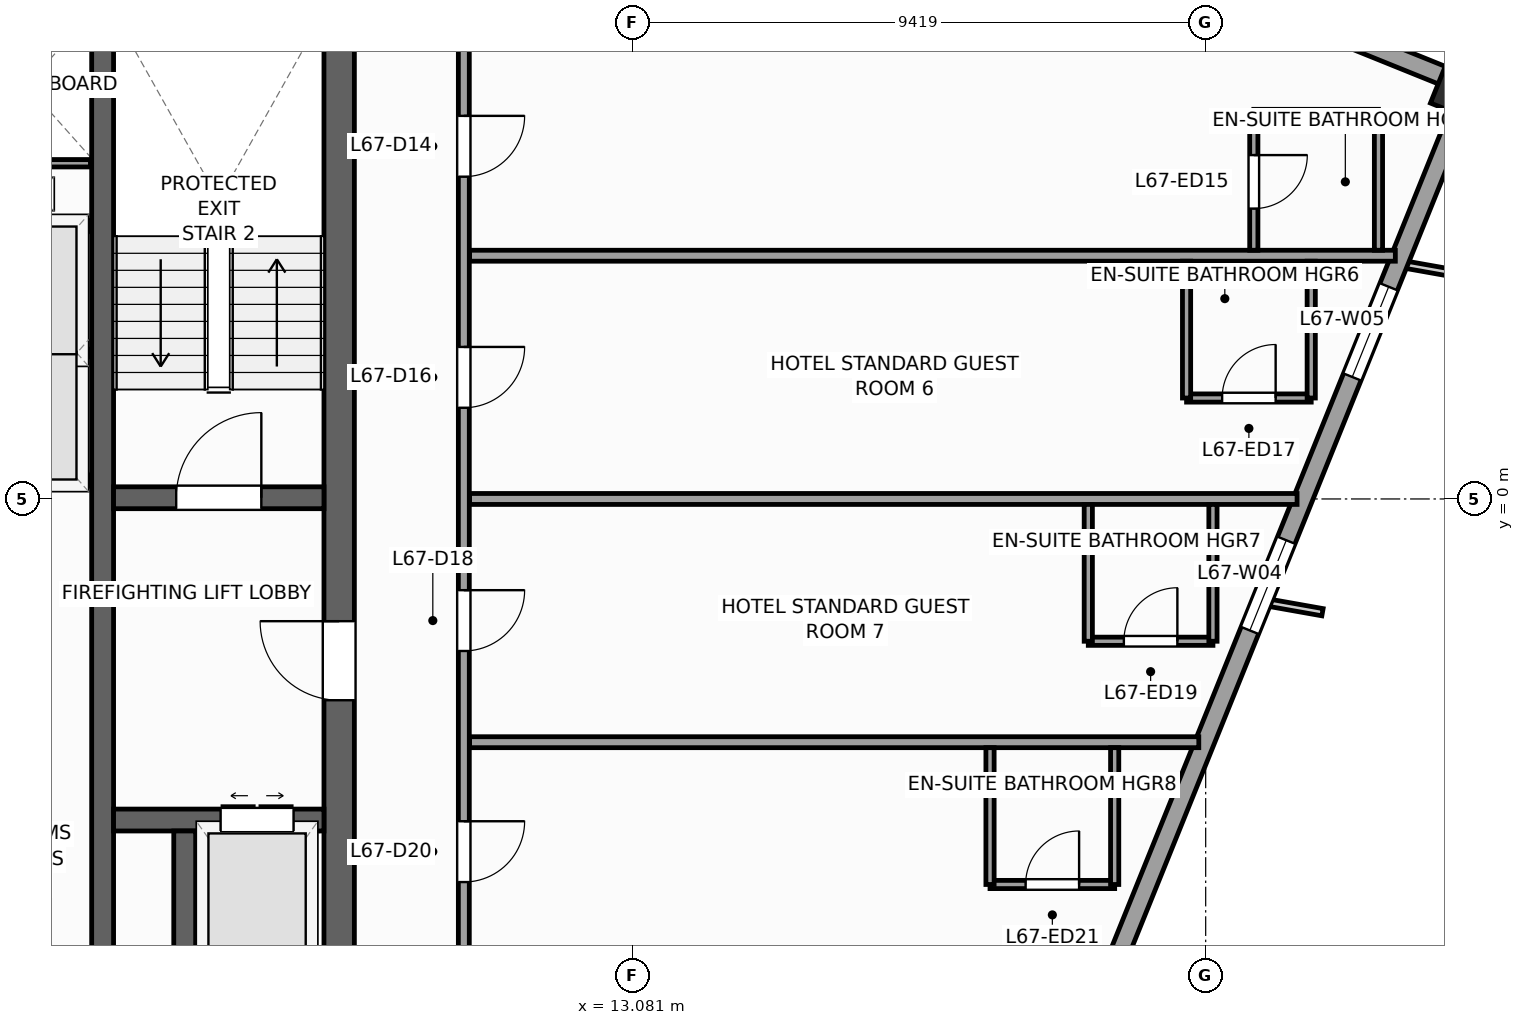
"""IFC4 building model, lengths in metres.
Left out: names, types, materials, properties, quantities, classifications, styles, units other than length and angle.
Written with IfcOpenShell. Run it as: python <this file> out.ifc"""

import sys

from ifc_helpers import new_model, si_unit, direction, frame, frame_2d, origin, origin_2d, place, context, subcontext, project, spatial, rectangle, extrude, source, transform, mapped, element, fill, save


model = new_model("IFC4")
c1 = context("Model", 3, precision=1e-05, world=origin(), true_north=direction((0.0, 1.0)))
c2 = subcontext(c1, "Body", "Model", "MODEL_VIEW")
j1 = project(units=[si_unit("LENGTHUNIT", "METRE"), si_unit("PLANEANGLEUNIT", "RADIAN")], contexts=[c1])
p1 = place(None, origin())
s1 = spatial("IfcSite", under=j1, at=p1, CompositionType="ELEMENT")
p2 = place(p1, origin())
s2 = spatial("IfcBuilding", under=s1, at=p2, CompositionType="ELEMENT")
p3 = place(p2, frame((0.0, 0.0, 276.0)))
s3 = spatial("IfcBuildingStorey", under=s2, at=p3, CompositionType="ELEMENT", Elevation=276.0)
p4 = place(p3, frame((8.25, -8.0, 0.0), z_axis=(0.0, 0.0, 1.0), x_axis=(0.0, 1.0, 0.0)))
e1 = element("IfcWall", 1, at=p4, inside=s3, PredefinedType="SHEAR", context=c2, shape_type="SweptSolid", body=[
    extrude(rectangle(XDim=16.0, YDim=0.5, at=frame_2d((8.0, 0.0))), origin(), (0.0, 0.0, 1.0), 3.6),
])
p5 = place(p4, frame((4.69, 0.0, 0.0)))
e2 = element("IfcOpeningElement", 2, at=p5, cuts=e1, PredefinedType="OPENING", context=c2, shape_type="SweptSolid", body=[
    extrude(rectangle(XDim=1.3, YDim=2.2, at=frame_2d((0.65, 1.1))), frame((0.0, 0.26, 0.0), z_axis=(0.0, -1.0, 0.0), x_axis=(1.0, 0.0, 0.0)), (0.0, 0.0, 1.0), 0.52),
])
p6 = place(p3, frame((4.36, -8.0, 0.0), z_axis=(0.0, 0.0, 1.0), x_axis=(0.0, 1.0, 0.0)))
e3 = element("IfcWall", 3, at=p6, inside=s3, PredefinedType="SHEAR", context=c2, shape_type="SweptSolid", body=[
    extrude(rectangle(XDim=16.0, YDim=0.36, at=frame_2d((8.0, 0.0))), origin(), (0.0, 0.0, 1.0), 3.6),
])
p7 = place(p3, frame((4.54, 0.02, 0.0), z_axis=(0.0, 0.0, 1.0), x_axis=(1.0, 0.0, 0.0)))
e4 = element("IfcWall", 4, at=p7, inside=s3, PredefinedType="SHEAR", context=c2, shape_type="SweptSolid", body=[
    extrude(rectangle(XDim=3.46, YDim=0.36, at=frame_2d((1.73, 0.0))), origin(), (0.0, 0.0, 1.0), 3.6),
])
p8 = place(p7, frame((1.03, 0.0, 0.0)))
e5 = element("IfcOpeningElement", 5, at=p8, cuts=e4, PredefinedType="OPENING", context=c2, shape_type="SweptSolid", body=[
    extrude(rectangle(XDim=1.4, YDim=2.2, at=frame_2d((0.7, 1.1))), frame((0.0, 0.19, 0.0), z_axis=(0.0, -1.0, 0.0), x_axis=(1.0, 0.0, 0.0)), (0.0, 0.0, 1.0), 0.38),
])
p9 = place(p3, frame((4.54, -5.28, 0.0), z_axis=(0.0, 0.0, 1.0), x_axis=(1.0, 0.0, 0.0)))
e6 = element("IfcWall", 6, at=p9, inside=s3, PredefinedType="SHEAR", context=c2, shape_type="SweptSolid", body=[
    extrude(rectangle(XDim=3.46, YDim=0.36, at=frame_2d((1.73, 0.0))), origin(), (0.0, 0.0, 1.0), 3.6),
])
p10 = place(p9, frame((1.76, 0.0, 0.0)))
e7 = element("IfcOpeningElement", 7, at=p10, cuts=e6, PredefinedType="OPENING", context=c2, shape_type="SweptSolid", body=[
    extrude(rectangle(XDim=1.2, YDim=2.25, at=frame_2d((0.6, 1.125))), frame((0.0, 0.19, 0.0), z_axis=(0.0, -1.0, 0.0), x_axis=(1.0, 0.0, 0.0)), (0.0, 0.0, 1.0), 0.38),
])
p11 = place(p3, frame((5.71, -8.0, 0.0), z_axis=(0.0, 0.0, 1.0), x_axis=(0.0, 1.0, 0.0)))
e8 = element("IfcWall", 8, at=p11, inside=s3, PredefinedType="SHEAR", context=c2, shape_type="SweptSolid", body=[
    extrude(rectangle(XDim=2.54, YDim=0.36, at=frame_2d((1.27, 0.0))), origin(), (0.0, 0.0, 1.0), 3.6),
])
m1 = source(origin(), c2, "Body", "SweptSolid", [
    extrude(rectangle(XDim=0.65, YDim=0.65, at=origin_2d()), origin(), (0.0, 0.0, 1.0), 3.6),
])
p12 = place(p3, frame((26.62, 6.69, 0.0), z_axis=(0.0, 0.0, 1.0), x_axis=(0.374606593416, 0.927183854567, 0.0)))
e9 = element("IfcColumn", 9, at=p12, inside=s3, PredefinedType="COLUMN", context=c2, shape_type="MappedRepresentation", body=[
    mapped(m1, transform((0.0, 0.0, 0.0), scale=1.0)),
])
p13 = place(p3, frame((14.479, -23.813, 0.0), z_axis=(0.0, 0.0, 1.0), x_axis=(0.374609557019, 0.927182657188, 0.0)))
e10 = element("IfcWall", 10, at=p13, inside=s3, PredefinedType="STANDARD", context=c2, shape_type="SweptSolid", body=[
    extrude(rectangle(XDim=33.31, YDim=0.31, at=frame_2d((16.655, 0.0))), origin(), (0.0, 0.0, 1.0), 2.75),
])
p14 = place(p13, frame((3.197, 0.0, 0.47)))
e11 = element("IfcOpeningElement", 11, at=p14, cuts=e10, PredefinedType="OPENING", context=c2, shape_type="SweptSolid", body=[
    extrude(rectangle(XDim=1.6, YDim=2.1, at=frame_2d((0.8, 1.05))), frame((0.0, 0.165, 0.0), z_axis=(0.0, -1.0, 0.0), x_axis=(1.0, 0.0, 0.0)), (0.0, 0.0, 1.0), 0.33),
])
p15 = place(p13, frame((8.86, 0.0, 0.47)))
e12 = element("IfcOpeningElement", 12, at=p15, cuts=e10, PredefinedType="OPENING", context=c2, shape_type="SweptSolid", body=[
    extrude(rectangle(XDim=1.6, YDim=2.1, at=frame_2d((0.8, 1.05))), frame((0.0, 0.165, 0.0), z_axis=(0.0, -1.0, 0.0), x_axis=(1.0, 0.0, 0.0)), (0.0, 0.0, 1.0), 0.33),
])
p16 = place(p13, frame((14.439, 0.0, 0.47)))
e13 = element("IfcOpeningElement", 13, at=p16, cuts=e10, PredefinedType="OPENING", context=c2, shape_type="SweptSolid", body=[
    extrude(rectangle(XDim=1.6, YDim=2.1, at=frame_2d((0.8, 1.05))), frame((0.0, 0.165, 0.0), z_axis=(0.0, -1.0, 0.0), x_axis=(1.0, 0.0, 0.0)), (0.0, 0.0, 1.0), 0.33),
])
p17 = place(p13, frame((23.351, 0.0, 0.47)))
e14 = element("IfcOpeningElement", 14, at=p17, cuts=e10, PredefinedType="OPENING", context=c2, shape_type="SweptSolid", body=[
    extrude(rectangle(XDim=1.6, YDim=2.1, at=frame_2d((0.8, 1.05))), frame((0.0, 0.165, 0.0), z_axis=(0.0, -1.0, 0.0), x_axis=(1.0, 0.0, 0.0)), (0.0, 0.0, 1.0), 0.33),
])
p18 = place(p13, frame((27.847, 0.0, 0.47)))
e15 = element("IfcOpeningElement", 15, at=p18, cuts=e10, PredefinedType="OPENING", context=c2, shape_type="SweptSolid", body=[
    extrude(rectangle(XDim=1.6, YDim=2.1, at=frame_2d((0.8, 1.05))), frame((0.0, 0.165, 0.0), z_axis=(0.0, -1.0, 0.0), x_axis=(1.0, 0.0, 0.0)), (0.0, 0.0, 1.0), 0.33),
])
p19 = place(p3, frame((26.841, 6.784, 0.0), z_axis=(0.0, 0.0, 1.0), x_axis=(-0.927171722085, 0.374636620962, 0.0)))
e16 = element("IfcWall", 16, at=p19, inside=s3, PredefinedType="STANDARD", context=c2, shape_type="SweptSolid", body=[
    extrude(rectangle(XDim=6.0, YDim=0.31, at=frame_2d((3.0, 0.0))), origin(), (0.0, 0.0, 1.0), 2.65),
])
for number, where, z_axis, x_axis in (
    (17, (1.89, 0.3, 0.0), (0.0, 0.0, 1.0), (1.0, 0.0, 0.0)),
    (18, (1.89, 4.49, 0.0), (0.0, 0.0, 1.0), (1.0, 0.0, 0.0)),
):
    element("IfcWall", number, at=place(p3, frame(where, z_axis=z_axis, x_axis=x_axis)), inside=s3, PredefinedType="PARTITIONING", context=c2, shape_type="SweptSolid", body=[
        extrude(rectangle(XDim=2.28, YDim=0.18, at=frame_2d((1.14, 0.0))), origin(), (0.0, 0.0, 1.0), 3.35),
    ])
p20 = place(p3, frame((1.9, 2.4, 0.0), z_axis=(0.0, 0.0, 1.0), x_axis=(1.0, 0.0, 0.0)))
e19 = element("IfcWall", 19, at=p20, inside=s3, PredefinedType="PARTITIONING", context=c2, shape_type="SweptSolid", body=[
    extrude(rectangle(XDim=2.26, YDim=0.12, at=frame_2d((1.13, 0.0))), origin(), (0.0, 0.0, 1.0), 3.35),
])
p21 = place(p3, frame((2.06, 5.52, 0.0), z_axis=(0.0, 0.0, 1.0), x_axis=(1.0, 0.0, 0.0)))
e20 = element("IfcWall", 20, at=p21, inside=s3, PredefinedType="PARTITIONING", context=c2, shape_type="SweptSolid", body=[
    extrude(rectangle(XDim=2.1, YDim=0.12, at=frame_2d((1.05, 0.0))), origin(), (0.0, 0.0, 1.0), 3.35),
])
p22 = place(p3, frame((10.3, -12.35, 0.0), z_axis=(0.0, 0.0, 1.0), x_axis=(0.0, 1.0, 0.0)))
e21 = element("IfcWall", 21, at=p22, inside=s3, PredefinedType="PARTITIONING", context=c2, shape_type="SweptSolid", body=[
    extrude(rectangle(XDim=23.7, YDim=0.18, at=frame_2d((11.85, 0.0))), origin(), (0.0, 0.0, 1.0), 3.35),
])
p23 = place(p22, frame((17.65, 0.0, 0.0)))
e22 = element("IfcOpeningElement", 22, at=p23, cuts=e21, PredefinedType="OPENING", context=c2, shape_type="SweptSolid", body=[
    extrude(rectangle(XDim=1.0, YDim=2.15, at=frame_2d((0.5, 1.075))), frame((0.0, 0.1, 0.0), z_axis=(0.0, -1.0, 0.0), x_axis=(1.0, 0.0, 0.0)), (0.0, 0.0, 1.0), 0.2),
])
p24 = place(p22, frame((13.85, 0.0, 0.0)))
e23 = element("IfcOpeningElement", 23, at=p24, cuts=e21, PredefinedType="OPENING", context=c2, shape_type="SweptSolid", body=[
    extrude(rectangle(XDim=1.0, YDim=2.15, at=frame_2d((0.5, 1.075))), frame((0.0, 0.1, 0.0), z_axis=(0.0, -1.0, 0.0), x_axis=(1.0, 0.0, 0.0)), (0.0, 0.0, 1.0), 0.2),
])
p25 = place(p22, frame((9.85, 0.0, 0.0)))
e24 = element("IfcOpeningElement", 24, at=p25, cuts=e21, PredefinedType="OPENING", context=c2, shape_type="SweptSolid", body=[
    extrude(rectangle(XDim=1.0, YDim=2.15, at=frame_2d((0.5, 1.075))), frame((0.0, 0.1, 0.0), z_axis=(0.0, -1.0, 0.0), x_axis=(1.0, 0.0, 0.0)), (0.0, 0.0, 1.0), 0.2),
])
p26 = place(p22, frame((6.05, 0.0, 0.0)))
e25 = element("IfcOpeningElement", 25, at=p26, cuts=e21, PredefinedType="OPENING", context=c2, shape_type="SweptSolid", body=[
    extrude(rectangle(XDim=1.0, YDim=2.15, at=frame_2d((0.5, 1.075))), frame((0.0, 0.1, 0.0), z_axis=(0.0, -1.0, 0.0), x_axis=(1.0, 0.0, 0.0)), (0.0, 0.0, 1.0), 0.2),
])
p27 = place(p3, frame((10.395, 4.0, 0.0), z_axis=(0.0, 0.0, 1.0), x_axis=(1.0, 0.0, 0.0)))
e26 = element("IfcWall", 26, at=p27, inside=s3, PredefinedType="PARTITIONING", context=c2, shape_type="SweptSolid", body=[
    extrude(rectangle(XDim=15.224, YDim=0.18, at=frame_2d((7.612, 0.0))), origin(), (0.0, 0.0, 1.0), 3.35),
])
p28 = place(p3, frame((10.395, 0.0, 0.0), z_axis=(0.0, 0.0, 1.0), x_axis=(1.0, 0.0, 0.0)))
e27 = element("IfcWall", 27, at=p28, inside=s3, PredefinedType="PARTITIONING", context=c2, shape_type="SweptSolid", body=[
    extrude(rectangle(XDim=13.608, YDim=0.18, at=frame_2d((6.804, 0.0))), origin(), (0.0, 0.0, 1.0), 3.02),
])
p29 = place(p3, frame((10.395, -4.0, 0.0), z_axis=(0.0, 0.0, 1.0), x_axis=(1.0, 0.0, 0.0)))
e28 = element("IfcWall", 28, at=p29, inside=s3, PredefinedType="PARTITIONING", context=c2, shape_type="SweptSolid", body=[
    extrude(rectangle(XDim=11.992, YDim=0.18, at=frame_2d((5.996, 0.0))), origin(), (0.0, 0.0, 1.0), 3.02),
])
p30 = place(p3, frame((25.342, 4.09, 0.0), z_axis=(0.0, 0.0, 1.0), x_axis=(0.0, 1.0, 0.0)))
e29 = element("IfcWall", 29, at=p30, inside=s3, PredefinedType="PARTITIONING", context=c2, shape_type="SweptSolid", body=[
    extrude(rectangle(XDim=2.25, YDim=0.135, at=frame_2d((1.125, 0.0))), origin(), (0.0, 0.0, 1.0), 2.75),
])
p31 = place(p3, frame((23.292, 6.34, 0.0), z_axis=(0.0, 0.0, 1.0), x_axis=(1.0, 0.0, 0.0)))
e30 = element("IfcWall", 30, at=p31, inside=s3, PredefinedType="PARTITIONING", context=c2, shape_type="SweptSolid", body=[
    extrude(rectangle(XDim=2.05, YDim=0.135, at=frame_2d((1.025, 0.0))), origin(), (0.0, 0.0, 1.0), 3.35),
])
p32 = place(p3, frame((23.292, 4.09, 0.0), z_axis=(0.0, 0.0, 1.0), x_axis=(0.0, 1.0, 0.0)))
e31 = element("IfcWall", 31, at=p32, inside=s3, PredefinedType="PARTITIONING", context=c2, shape_type="SweptSolid", body=[
    extrude(rectangle(XDim=2.25, YDim=0.135, at=frame_2d((1.125, 0.0))), origin(), (0.0, 0.0, 1.0), 2.95),
])
p33 = place(p32, frame((0.685, 0.0, 0.0)))
e32 = element("IfcOpeningElement", 32, at=p33, cuts=e31, PredefinedType="OPENING", context=c2, shape_type="SweptSolid", body=[
    extrude(rectangle(XDim=0.88, YDim=2.1, at=frame_2d((0.44, 1.05))), frame((0.0, 0.078, 0.0), z_axis=(0.0, -1.0, 0.0), x_axis=(1.0, 0.0, 0.0)), (0.0, 0.0, 1.0), 0.155),
])
p34 = place(p3, frame((22.186, 1.66, 0.0), z_axis=(0.0, 0.0, 1.0), x_axis=(1.0, 0.0, 0.0)))
e33 = element("IfcWall", 33, at=p34, inside=s3, PredefinedType="PARTITIONING", context=c2, shape_type="SweptSolid", body=[
    extrude(rectangle(XDim=2.05, YDim=0.135, at=frame_2d((1.025, 0.0))), origin(), (0.0, 0.0, 1.0), 3.35),
])
p35 = place(p34, frame((0.585, 0.0, 0.0)))
e34 = element("IfcOpeningElement", 34, at=p35, cuts=e33, PredefinedType="OPENING", context=c2, shape_type="SweptSolid", body=[
    extrude(rectangle(XDim=0.88, YDim=2.1, at=frame_2d((0.44, 1.05))), frame((0.0, 0.078, 0.0), z_axis=(0.0, -1.0, 0.0), x_axis=(1.0, 0.0, 0.0)), (0.0, 0.0, 1.0), 0.155),
])
for number, where, z_axis, x_axis in (
    (35, (24.236, 1.66, 0.0), (0.0, 0.0, 1.0), (0.0, 1.0, 0.0)),
    (36, (22.186, 1.66, 0.0), (0.0, 0.0, 1.0), (0.0, 1.0, 0.0)),
):
    element("IfcWall", number, at=place(p3, frame(where, z_axis=z_axis, x_axis=x_axis)), inside=s3, PredefinedType="PARTITIONING", context=c2, shape_type="SweptSolid", body=[
        extrude(rectangle(XDim=2.25, YDim=0.135, at=frame_2d((1.125, 0.0))), origin(), (0.0, 0.0, 1.0), 3.35),
    ])
p36 = place(p3, frame((20.57, -2.34, 0.0), z_axis=(0.0, 0.0, 1.0), x_axis=(1.0, 0.0, 0.0)))
e37 = element("IfcWall", 37, at=p36, inside=s3, PredefinedType="PARTITIONING", context=c2, shape_type="SweptSolid", body=[
    extrude(rectangle(XDim=2.05, YDim=0.135, at=frame_2d((1.025, 0.0))), origin(), (0.0, 0.0, 1.0), 3.35),
])
p37 = place(p36, frame((0.585, 0.0, 0.0)))
e38 = element("IfcOpeningElement", 38, at=p37, cuts=e37, PredefinedType="OPENING", context=c2, shape_type="SweptSolid", body=[
    extrude(rectangle(XDim=0.88, YDim=2.1, at=frame_2d((0.44, 1.05))), frame((0.0, 0.078, 0.0), z_axis=(0.0, -1.0, 0.0), x_axis=(1.0, 0.0, 0.0)), (0.0, 0.0, 1.0), 0.155),
])
for number, where, z_axis, x_axis in (
    (39, (22.619, -2.34, 0.0), (0.0, 0.0, 1.0), (0.0, 1.0, 0.0)),
    (40, (20.57, -2.34, 0.0), (0.0, 0.0, 1.0), (0.0, 1.0, 0.0)),
):
    element("IfcWall", number, at=place(p3, frame(where, z_axis=z_axis, x_axis=x_axis)), inside=s3, PredefinedType="PARTITIONING", context=c2, shape_type="SweptSolid", body=[
        extrude(rectangle(XDim=2.25, YDim=0.135, at=frame_2d((1.125, 0.0))), origin(), (0.0, 0.0, 1.0), 3.35),
    ])
p38 = place(p3, frame((18.953, -6.34, 0.0), z_axis=(0.0, 0.0, 1.0), x_axis=(1.0, 0.0, 0.0)))
e41 = element("IfcWall", 41, at=p38, inside=s3, PredefinedType="PARTITIONING", context=c2, shape_type="SweptSolid", body=[
    extrude(rectangle(XDim=2.05, YDim=0.135, at=frame_2d((1.025, 0.0))), origin(), (0.0, 0.0, 1.0), 3.35),
])
p39 = place(p38, frame((0.585, 0.0, 0.0)))
e42 = element("IfcOpeningElement", 42, at=p39, cuts=e41, PredefinedType="OPENING", context=c2, shape_type="SweptSolid", body=[
    extrude(rectangle(XDim=0.88, YDim=2.1, at=frame_2d((0.44, 1.05))), frame((0.0, 0.078, 0.0), z_axis=(0.0, -1.0, 0.0), x_axis=(1.0, 0.0, 0.0)), (0.0, 0.0, 1.0), 0.155),
])
for number, where, z_axis, x_axis in (
    (43, (21.003, -6.34, 0.0), (0.0, 0.0, 1.0), (0.0, 1.0, 0.0)),
    (44, (18.953, -6.34, 0.0), (0.0, 0.0, 1.0), (0.0, 1.0, 0.0)),
):
    element("IfcWall", number, at=place(p3, frame(where, z_axis=z_axis, x_axis=x_axis)), inside=s3, PredefinedType="PARTITIONING", context=c2, shape_type="SweptSolid", body=[
        extrude(rectangle(XDim=2.25, YDim=0.135, at=frame_2d((1.125, 0.0))), origin(), (0.0, 0.0, 1.0), 3.35),
    ])
m2 = source(origin(), c2, "Body", "SweptSolid", [
    extrude(rectangle(XDim=1.6, YDim=2.1, at=frame_2d((0.8, 1.05))), frame((0.0, 0.03, 0.0), z_axis=(0.0, -1.0, 0.0), x_axis=(1.0, 0.0, 0.0)), (0.0, 0.0, 1.0), 0.06),
])
p40 = place(p17, origin())
e45 = element("IfcWindow", 45, at=p40, inside=s3, PartitioningType="SINGLE_PANEL", PredefinedType="WINDOW", context=c2, shape_type="MappedRepresentation", body=[
    mapped(m2, transform((0.0, 0.0, 0.0), scale=1.0)),
])
fill(e14, e45)
p41 = place(p18, origin())
e46 = element("IfcWindow", 46, at=p41, inside=s3, PartitioningType="SINGLE_PANEL", PredefinedType="WINDOW", context=c2, shape_type="MappedRepresentation", body=[
    mapped(m2, transform((0.0, 0.0, 0.0), scale=1.0)),
])
fill(e15, e46)
m3 = source(origin(), c2, "Body", "SweptSolid", [
    extrude(rectangle(XDim=1.4, YDim=2.2, at=frame_2d((0.7, 1.1))), frame((0.0, 0.025, 0.0), z_axis=(0.0, -1.0, 0.0), x_axis=(1.0, 0.0, 0.0)), (0.0, 0.0, 1.0), 0.05),
])
p42 = place(p8, origin())
e47 = element("IfcDoor", 47, at=p42, inside=s3, OperationType="SINGLE_SWING_RIGHT", PredefinedType="DOOR", context=c2, shape_type="MappedRepresentation", body=[
    mapped(m3, transform((0.0, 0.0, 0.0), scale=1.0)),
])
fill(e5, e47)
m4 = source(origin(), c2, "Body", "SweptSolid", [
    extrude(rectangle(XDim=1.3, YDim=2.2, at=frame_2d((0.65, 1.1))), frame((0.0, 0.025, 0.0), z_axis=(0.0, -1.0, 0.0), x_axis=(1.0, 0.0, 0.0)), (0.0, 0.0, 1.0), 0.05),
])
p43 = place(p5, origin())
e48 = element("IfcDoor", 48, at=p43, inside=s3, OperationType="SINGLE_SWING_RIGHT", PredefinedType="DOOR", context=c2, shape_type="MappedRepresentation", body=[
    mapped(m4, transform((0.0, 0.0, 0.0), scale=1.0)),
])
fill(e2, e48)
m5 = source(origin(), c2, "Body", "SweptSolid", [
    extrude(rectangle(XDim=1.2, YDim=2.25, at=frame_2d((0.6, 1.125))), frame((0.0, 0.025, 0.0), z_axis=(0.0, -1.0, 0.0), x_axis=(1.0, 0.0, 0.0)), (0.0, 0.0, 1.0), 0.05),
])
p44 = place(p10, origin())
e49 = element("IfcDoor", 49, at=p44, inside=s3, OperationType="DOUBLE_DOOR_SLIDING", PredefinedType="DOOR", context=c2, shape_type="MappedRepresentation", body=[
    mapped(m5, transform((0.0, 0.0, 0.0), scale=1.0)),
])
fill(e7, e49)
m6 = source(origin(), c2, "Body", "SweptSolid", [
    extrude(rectangle(XDim=1.0, YDim=2.15, at=frame_2d((0.5, 1.075))), frame((0.0, 0.025, 0.0), z_axis=(0.0, -1.0, 0.0), x_axis=(1.0, 0.0, 0.0)), (0.0, 0.0, 1.0), 0.05),
])
p45 = place(p23, frame((1.0, 0.0, 0.0), z_axis=(0.0, 0.0, 1.0), x_axis=(-1.0, 0.0, 0.0)))
e50 = element("IfcDoor", 50, at=p45, inside=s3, OperationType="SINGLE_SWING_RIGHT", PredefinedType="DOOR", context=c2, shape_type="MappedRepresentation", body=[
    mapped(m6, transform((0.0, 0.0, 0.0), scale=1.0)),
])
fill(e22, e50)
m7 = source(origin(), c2, "Body", "SweptSolid", [
    extrude(rectangle(XDim=0.88, YDim=2.1, at=frame_2d((0.44, 1.05))), frame((0.0, 0.025, 0.0), z_axis=(0.0, -1.0, 0.0), x_axis=(1.0, 0.0, 0.0)), (0.0, 0.0, 1.0), 0.05),
])
p46 = place(p33, frame((0.88, 0.0, 0.0), z_axis=(0.0, 0.0, 1.0), x_axis=(-1.0, 0.0, 0.0)))
e51 = element("IfcDoor", 51, at=p46, inside=s3, OperationType="SINGLE_SWING_RIGHT", PredefinedType="DOOR", context=c2, shape_type="MappedRepresentation", body=[
    mapped(m7, transform((0.0, 0.0, 0.0), scale=1.0)),
])
fill(e32, e51)
p47 = place(p24, frame((1.0, 0.0, 0.0), z_axis=(0.0, 0.0, 1.0), x_axis=(-1.0, 0.0, 0.0)))
e52 = element("IfcDoor", 52, at=p47, inside=s3, OperationType="SINGLE_SWING_RIGHT", PredefinedType="DOOR", context=c2, shape_type="MappedRepresentation", body=[
    mapped(m6, transform((0.0, 0.0, 0.0), scale=1.0)),
])
fill(e23, e52)
p48 = place(p35, origin())
e53 = element("IfcDoor", 53, at=p48, inside=s3, OperationType="SINGLE_SWING_RIGHT", PredefinedType="DOOR", context=c2, shape_type="MappedRepresentation", body=[
    mapped(m7, transform((0.0, 0.0, 0.0), scale=1.0)),
])
fill(e34, e53)
p49 = place(p25, frame((1.0, 0.0, 0.0), z_axis=(0.0, 0.0, 1.0), x_axis=(-1.0, 0.0, 0.0)))
e54 = element("IfcDoor", 54, at=p49, inside=s3, OperationType="SINGLE_SWING_RIGHT", PredefinedType="DOOR", context=c2, shape_type="MappedRepresentation", body=[
    mapped(m6, transform((0.0, 0.0, 0.0), scale=1.0)),
])
fill(e24, e54)
p50 = place(p37, origin())
e55 = element("IfcDoor", 55, at=p50, inside=s3, OperationType="SINGLE_SWING_RIGHT", PredefinedType="DOOR", context=c2, shape_type="MappedRepresentation", body=[
    mapped(m7, transform((0.0, 0.0, 0.0), scale=1.0)),
])
fill(e38, e55)
p51 = place(p26, frame((1.0, 0.0, 0.0), z_axis=(0.0, 0.0, 1.0), x_axis=(-1.0, 0.0, 0.0)))
e56 = element("IfcDoor", 56, at=p51, inside=s3, OperationType="SINGLE_SWING_RIGHT", PredefinedType="DOOR", context=c2, shape_type="MappedRepresentation", body=[
    mapped(m6, transform((0.0, 0.0, 0.0), scale=1.0)),
])
fill(e25, e56)
p52 = place(p39, origin())
e57 = element("IfcDoor", 57, at=p52, inside=s3, OperationType="SINGLE_SWING_RIGHT", PredefinedType="DOOR", context=c2, shape_type="MappedRepresentation", body=[
    mapped(m7, transform((0.0, 0.0, 0.0), scale=1.0)),
])
fill(e42, e57)
save(model, sys.argv[1])
